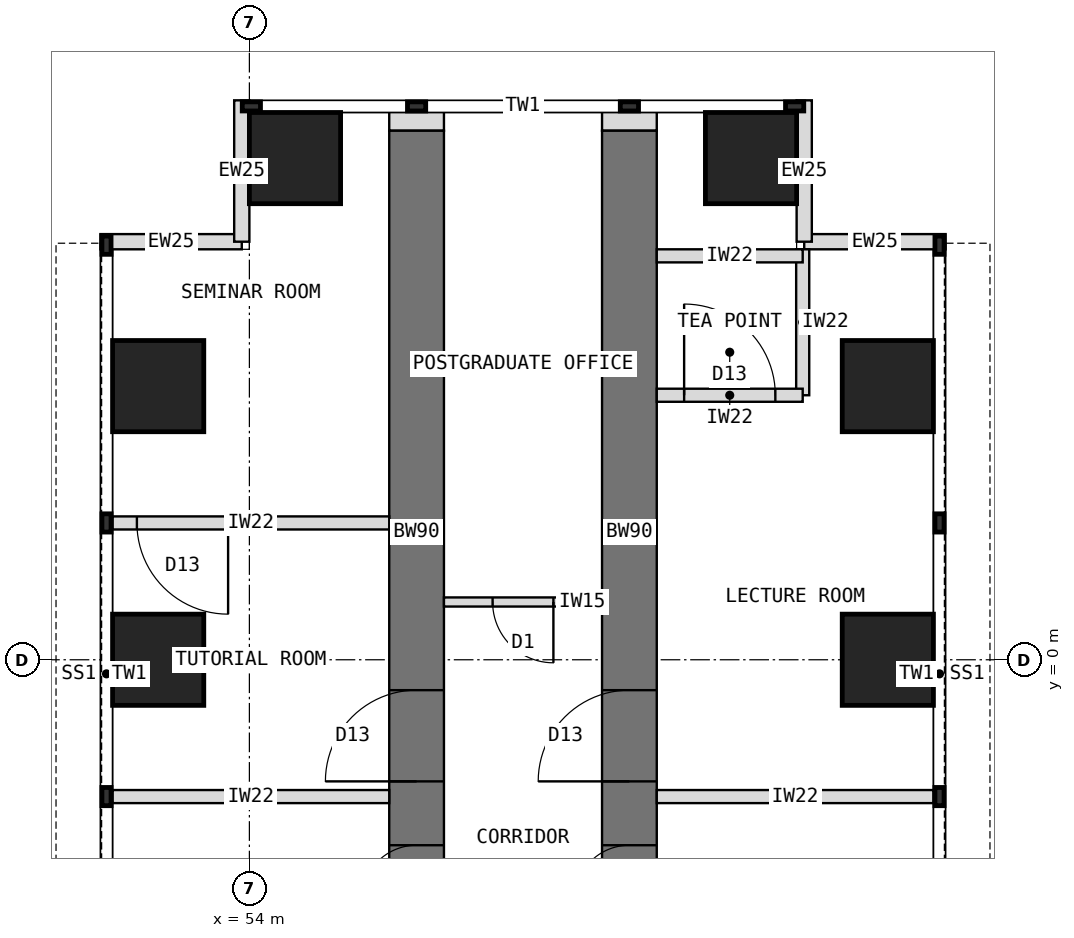
"""IFC4 building model, lengths in metres.
Left out: names, types, materials, properties, quantities, classifications, styles, units other than length and angle.
Written with IfcOpenShell. Run it as: python <this file> out.ifc"""

import sys

from ifc_helpers import new_model, si_unit, direction, frame, frame_2d, origin, origin_2d, place, context, subcontext, project, spatial, rectangle, extrude, element, fill, save


model = new_model("IFC4")
c1 = context("Model", 3, precision=1e-05, world=origin(), true_north=direction((0.0, 1.0)))
c2 = subcontext(c1, "Body", "Model", "MODEL_VIEW")
j1 = project(units=[si_unit("LENGTHUNIT", "METRE"), si_unit("PLANEANGLEUNIT", "RADIAN")], contexts=[c1])
p1 = place(None, origin())
s1 = spatial("IfcSite", under=j1, at=p1, CompositionType="ELEMENT")
p2 = place(p1, origin())
s2 = spatial("IfcBuilding", under=s1, at=p2, CompositionType="ELEMENT")
p3 = place(p2, frame((0.0, 0.0, 28.5)))
s3 = spatial("IfcBuildingStorey", under=s2, at=p3, CompositionType="ELEMENT", Elevation=28.5)
p4 = place(p3, frame((56.75, -4.5, 0.0), z_axis=(0.0, 0.0, 1.0), x_axis=(0.0, 1.0, 0.0)))
e1 = element("IfcWall", 1, at=p4, inside=s3, PredefinedType="SHEAR", context=c2, shape_type="SweptSolid", body=[
    extrude(rectangle(XDim=13.2, YDim=0.9, at=frame_2d((6.6, 0.0))), origin(), (0.0, 0.0, 1.0), 4.0),
])
p5 = place(p4, frame((0.55, 0.0, 0.0)))
e2 = element("IfcOpeningElement", 2, at=p5, cuts=e1, PredefinedType="OPENING", context=c2, shape_type="SweptSolid", body=[
    extrude(rectangle(XDim=0.9, YDim=2.1, at=frame_2d((0.45, 1.05))), frame((0.0, 0.46, 0.0), z_axis=(0.0, -1.0, 0.0), x_axis=(1.0, 0.0, 0.0)), (0.0, 0.0, 1.0), 0.92),
])
p6 = place(p4, frame((2.5, 0.0, 0.0)))
e3 = element("IfcOpeningElement", 3, at=p6, cuts=e1, PredefinedType="OPENING", context=c2, shape_type="SweptSolid", body=[
    extrude(rectangle(XDim=1.5, YDim=2.1, at=frame_2d((0.75, 1.05))), frame((0.0, 0.46, 0.0), z_axis=(0.0, -1.0, 0.0), x_axis=(1.0, 0.0, 0.0)), (0.0, 0.0, 1.0), 0.92),
])
p7 = place(p3, frame((60.25, -4.5, 0.0), z_axis=(0.0, 0.0, 1.0), x_axis=(0.0, 1.0, 0.0)))
e4 = element("IfcWall", 4, at=p7, inside=s3, PredefinedType="SHEAR", context=c2, shape_type="SweptSolid", body=[
    extrude(rectangle(XDim=13.2, YDim=0.9, at=frame_2d((6.6, 0.0))), origin(), (0.0, 0.0, 1.0), 4.0),
])
p8 = place(p7, frame((0.55, 0.0, 0.0)))
e5 = element("IfcOpeningElement", 5, at=p8, cuts=e4, PredefinedType="OPENING", context=c2, shape_type="SweptSolid", body=[
    extrude(rectangle(XDim=0.9, YDim=2.1, at=frame_2d((0.45, 1.05))), frame((0.0, 0.46, 0.0), z_axis=(0.0, -1.0, 0.0), x_axis=(1.0, 0.0, 0.0)), (0.0, 0.0, 1.0), 0.92),
])
p9 = place(p7, frame((2.5, 0.0, 0.0)))
e6 = element("IfcOpeningElement", 6, at=p9, cuts=e4, PredefinedType="OPENING", context=c2, shape_type="SweptSolid", body=[
    extrude(rectangle(XDim=1.5, YDim=2.1, at=frame_2d((0.75, 1.05))), frame((0.0, 0.46, 0.0), z_axis=(0.0, -1.0, 0.0), x_axis=(1.0, 0.0, 0.0)), (0.0, 0.0, 1.0), 0.92),
])
for number, where, z_axis, x_axis in (
    (7, (52.5, 0.0, 0.0), (0.0, 0.0, 1.0), (1.0, 0.0, 0.0)),
    (8, (64.5, 0.0, 0.0), (0.0, 0.0, 1.0), (1.0, 0.0, 0.0)),
    (9, (52.5, 4.5, 0.0), (0.0, 0.0, 1.0), (1.0, 0.0, 0.0)),
    (10, (64.5, 4.5, 0.0), (0.0, 0.0, 1.0), (1.0, 0.0, 0.0)),
    (11, (54.75, 8.25, 0.0), (0.0, 0.0, 1.0), (1.0, 0.0, 0.0)),
    (12, (62.25, 8.25, 0.0), (0.0, 0.0, 1.0), (1.0, 0.0, 0.0)),
):
    element("IfcColumn", number, at=place(p3, frame(where, z_axis=z_axis, x_axis=x_axis)), inside=s3, PredefinedType="COLUMN", context=c2, shape_type="SweptSolid", body=[
        extrude(rectangle(XDim=1.5, YDim=1.5, at=origin_2d()), origin(), (0.0, 0.0, 1.0), 4.0),
    ])
for number, where, z_axis, x_axis in (
    (13, (51.55, 6.875, 0.0), (0.0, 0.0, 1.0), (1.0, 0.0, 0.0)),
    (14, (53.875, 6.875, 0.0), (0.0, 0.0, 1.0), (0.0, 1.0, 0.0)),
    (15, (65.45, 6.875, 0.0), (0.0, 0.0, 1.0), (-1.0, 0.0, 0.0)),
    (16, (63.125, 6.875, 0.0), (0.0, 0.0, 1.0), (0.0, 1.0, 0.0)),
):
    element("IfcWall", number, at=place(p3, frame(where, z_axis=z_axis, x_axis=x_axis)), inside=s3, PredefinedType="STANDARD", context=c2, shape_type="SweptSolid", body=[
        extrude(rectangle(XDim=2.325, YDim=0.25, at=frame_2d((1.163, 0.0))), origin(), (0.0, 0.0, 1.0), 3.8),
    ])
for number, where, z_axis, x_axis in (
    (17, (56.75, 8.7, 0.0), (0.0, 0.0, 1.0), (0.0, 1.0, 0.0)),
    (18, (60.25, 8.7, 0.0), (0.0, 0.0, 1.0), (0.0, 1.0, 0.0)),
):
    element("IfcWall", number, at=place(p3, frame(where, z_axis=z_axis, x_axis=x_axis)), inside=s3, PredefinedType="PARTITIONING", context=c2, shape_type="SweptSolid", body=[
        extrude(rectangle(XDim=0.31, YDim=0.9, at=frame_2d((0.155, 0.0))), origin(), (0.0, 0.0, 1.0), 3.8),
    ])
p10 = place(p3, frame((56.3, -2.25, 0.0), z_axis=(0.0, 0.0, 1.0), x_axis=(-1.0, 0.0, 0.0)))
e19 = element("IfcWall", 19, at=p10, inside=s3, PredefinedType="PARTITIONING", context=c2, shape_type="SweptSolid", body=[
    extrude(rectangle(XDim=4.55, YDim=0.215, at=frame_2d((2.275, 0.0))), origin(), (0.0, 0.0, 1.0), 3.8),
])
p11 = place(p3, frame((56.3, 2.25, 0.0), z_axis=(0.0, 0.0, 1.0), x_axis=(-1.0, 0.0, 0.0)))
e20 = element("IfcWall", 20, at=p11, inside=s3, PredefinedType="PARTITIONING", context=c2, shape_type="SweptSolid", body=[
    extrude(rectangle(XDim=4.55, YDim=0.215, at=frame_2d((2.275, 0.0))), origin(), (0.0, 0.0, 1.0), 3.8),
])
p12 = place(p11, frame((2.65, 0.0, 0.0)))
e21 = element("IfcOpeningElement", 21, at=p12, cuts=e20, PredefinedType="OPENING", context=c2, shape_type="SweptSolid", body=[
    extrude(rectangle(XDim=1.5, YDim=2.1, at=frame_2d((0.75, 1.05))), frame((0.0, 0.117, 0.0), z_axis=(0.0, -1.0, 0.0), x_axis=(1.0, 0.0, 0.0)), (0.0, 0.0, 1.0), 0.235),
])
p13 = place(p3, frame((60.7, -2.25, 0.0), z_axis=(0.0, 0.0, 1.0), x_axis=(1.0, 0.0, 0.0)))
e22 = element("IfcWall", 22, at=p13, inside=s3, PredefinedType="PARTITIONING", context=c2, shape_type="SweptSolid", body=[
    extrude(rectangle(XDim=4.55, YDim=0.215, at=frame_2d((2.275, 0.0))), origin(), (0.0, 0.0, 1.0), 3.8),
])
p14 = place(p3, frame((63.1, 4.35, 0.0), z_axis=(0.0, 0.0, 1.0), x_axis=(0.0, 1.0, 0.0)))
e23 = element("IfcWall", 23, at=p14, inside=s3, PredefinedType="PARTITIONING", context=c2, shape_type="SweptSolid", body=[
    extrude(rectangle(XDim=2.4, YDim=0.215, at=frame_2d((1.2, 0.0))), origin(), (0.0, 0.0, 1.0), 3.8),
])
p15 = place(p3, frame((60.7, 4.35, 0.0), z_axis=(0.0, 0.0, 1.0), x_axis=(1.0, 0.0, 0.0)))
e24 = element("IfcWall", 24, at=p15, inside=s3, PredefinedType="PARTITIONING", context=c2, shape_type="SweptSolid", body=[
    extrude(rectangle(XDim=2.4, YDim=0.215, at=frame_2d((1.2, 0.0))), origin(), (0.0, 0.0, 1.0), 3.8),
])
p16 = place(p15, frame((0.45, 0.0, 0.0)))
e25 = element("IfcOpeningElement", 25, at=p16, cuts=e24, PredefinedType="OPENING", context=c2, shape_type="SweptSolid", body=[
    extrude(rectangle(XDim=1.5, YDim=2.1, at=frame_2d((0.75, 1.05))), frame((0.0, 0.117, 0.0), z_axis=(0.0, -1.0, 0.0), x_axis=(1.0, 0.0, 0.0)), (0.0, 0.0, 1.0), 0.235),
])
p17 = place(p3, frame((60.7, 6.643, 0.0), z_axis=(0.0, 0.0, 1.0), x_axis=(1.0, 0.0, 0.0)))
e26 = element("IfcWall", 26, at=p17, inside=s3, PredefinedType="PARTITIONING", context=c2, shape_type="SweptSolid", body=[
    extrude(rectangle(XDim=2.4, YDim=0.215, at=frame_2d((1.2, 0.0))), origin(), (0.0, 0.0, 1.0), 3.8),
])
p18 = place(p3, frame((59.8, 0.95, 0.0), z_axis=(0.0, 0.0, 1.0), x_axis=(-1.0, 0.0, 0.0)))
e27 = element("IfcWall", 27, at=p18, inside=s3, PredefinedType="PARTITIONING", context=c2, shape_type="SweptSolid", body=[
    extrude(rectangle(XDim=2.6, YDim=0.15, at=frame_2d((1.3, 0.0))), origin(), (0.0, 0.0, 1.0), 3.8),
])
p19 = place(p18, frame((0.8, 0.0, 0.0)))
e28 = element("IfcOpeningElement", 28, at=p19, cuts=e27, PredefinedType="OPENING", context=c2, shape_type="SweptSolid", body=[
    extrude(rectangle(XDim=1.0, YDim=2.1, at=frame_2d((0.5, 1.05))), frame((0.0, 0.085, 0.0), z_axis=(0.0, -1.0, 0.0), x_axis=(1.0, 0.0, 0.0)), (0.0, 0.0, 1.0), 0.17),
])
p20 = place(p12, origin())
e29 = element("IfcDoor", 29, at=p20, inside=s3, OperationType="DOUBLE_DOOR_SINGLE_SWING", PredefinedType="DOOR", context=c2, shape_type="SweptSolid", body=[
    extrude(rectangle(XDim=1.5, YDim=2.1, at=frame_2d((0.75, 1.05))), frame((0.0, 0.025, 0.0), z_axis=(0.0, -1.0, 0.0), x_axis=(1.0, 0.0, 0.0)), (0.0, 0.0, 1.0), 0.05),
])
fill(e21, e29)
p21 = place(p16, origin())
e30 = element("IfcDoor", 30, at=p21, inside=s3, OperationType="DOUBLE_DOOR_SINGLE_SWING", PredefinedType="DOOR", context=c2, shape_type="SweptSolid", body=[
    extrude(rectangle(XDim=1.5, YDim=2.1, at=frame_2d((0.75, 1.05))), frame((0.0, 0.025, 0.0), z_axis=(0.0, -1.0, 0.0), x_axis=(1.0, 0.0, 0.0)), (0.0, 0.0, 1.0), 0.05),
])
fill(e25, e30)
p22 = place(p19, origin())
e31 = element("IfcDoor", 31, at=p22, inside=s3, OperationType="SINGLE_SWING_LEFT", PredefinedType="DOOR", context=c2, shape_type="SweptSolid", body=[
    extrude(rectangle(XDim=1.0, YDim=2.1, at=frame_2d((0.5, 1.05))), frame((0.0, 0.025, 0.0), z_axis=(0.0, -1.0, 0.0), x_axis=(1.0, 0.0, 0.0)), (0.0, 0.0, 1.0), 0.05),
])
fill(e28, e31)
p23 = place(p5, origin())
e32 = element("IfcDoor", 32, at=p23, inside=s3, OperationType="SINGLE_SWING_LEFT", PredefinedType="DOOR", context=c2, shape_type="SweptSolid", body=[
    extrude(rectangle(XDim=0.82, YDim=2.06, at=frame_2d((0.45, 1.03))), frame((0.0, 0.025, 0.0), z_axis=(0.0, -1.0, 0.0), x_axis=(1.0, 0.0, 0.0)), (0.0, 0.0, 1.0), 0.05),
    extrude(rectangle(XDim=0.04, YDim=2.1, at=frame_2d((0.02, 1.05))), frame((0.0, 0.45, 0.0), z_axis=(0.0, -1.0, 0.0), x_axis=(1.0, 0.0, 0.0)), (0.0, 0.0, 1.0), 0.899),
    extrude(rectangle(XDim=0.04, YDim=2.1, at=frame_2d((0.88, 1.05))), frame((0.0, 0.45, 0.0), z_axis=(0.0, -1.0, 0.0), x_axis=(1.0, 0.0, 0.0)), (0.0, 0.0, 1.0), 0.899),
    extrude(rectangle(XDim=0.82, YDim=0.04, at=frame_2d((0.45, 2.08))), frame((0.0, 0.45, 0.0), z_axis=(0.0, -1.0, 0.0), x_axis=(1.0, 0.0, 0.0)), (0.0, 0.0, 1.0), 0.899),
])
fill(e2, e32)
p24 = place(p6, origin())
e33 = element("IfcDoor", 33, at=p24, inside=s3, OperationType="DOUBLE_DOOR_SINGLE_SWING", PredefinedType="DOOR", context=c2, shape_type="SweptSolid", body=[
    extrude(rectangle(XDim=1.42, YDim=2.06, at=frame_2d((0.75, 1.03))), frame((0.0, 0.025, 0.0), z_axis=(0.0, -1.0, 0.0), x_axis=(1.0, 0.0, 0.0)), (0.0, 0.0, 1.0), 0.05),
    extrude(rectangle(XDim=0.04, YDim=2.1, at=frame_2d((0.02, 1.05))), frame((0.0, 0.45, 0.0), z_axis=(0.0, -1.0, 0.0), x_axis=(1.0, 0.0, 0.0)), (0.0, 0.0, 1.0), 0.899),
    extrude(rectangle(XDim=0.04, YDim=2.1, at=frame_2d((1.48, 1.05))), frame((0.0, 0.45, 0.0), z_axis=(0.0, -1.0, 0.0), x_axis=(1.0, 0.0, 0.0)), (0.0, 0.0, 1.0), 0.899),
    extrude(rectangle(XDim=1.42, YDim=0.04, at=frame_2d((0.75, 2.08))), frame((0.0, 0.45, 0.0), z_axis=(0.0, -1.0, 0.0), x_axis=(1.0, 0.0, 0.0)), (0.0, 0.0, 1.0), 0.899),
])
fill(e3, e33)
p25 = place(p8, origin())
e34 = element("IfcDoor", 34, at=p25, inside=s3, OperationType="SINGLE_SWING_LEFT", PredefinedType="DOOR", context=c2, shape_type="SweptSolid", body=[
    extrude(rectangle(XDim=0.82, YDim=2.06, at=frame_2d((0.45, 1.03))), frame((0.0, 0.025, 0.0), z_axis=(0.0, -1.0, 0.0), x_axis=(1.0, 0.0, 0.0)), (0.0, 0.0, 1.0), 0.05),
    extrude(rectangle(XDim=0.04, YDim=2.1, at=frame_2d((0.02, 1.05))), frame((0.0, 0.45, 0.0), z_axis=(0.0, -1.0, 0.0), x_axis=(1.0, 0.0, 0.0)), (0.0, 0.0, 1.0), 0.899),
    extrude(rectangle(XDim=0.04, YDim=2.1, at=frame_2d((0.88, 1.05))), frame((0.0, 0.45, 0.0), z_axis=(0.0, -1.0, 0.0), x_axis=(1.0, 0.0, 0.0)), (0.0, 0.0, 1.0), 0.899),
    extrude(rectangle(XDim=0.82, YDim=0.04, at=frame_2d((0.45, 2.08))), frame((0.0, 0.45, 0.0), z_axis=(0.0, -1.0, 0.0), x_axis=(1.0, 0.0, 0.0)), (0.0, 0.0, 1.0), 0.899),
])
fill(e5, e34)
p26 = place(p9, origin())
e35 = element("IfcDoor", 35, at=p26, inside=s3, OperationType="DOUBLE_DOOR_SINGLE_SWING", PredefinedType="DOOR", context=c2, shape_type="SweptSolid", body=[
    extrude(rectangle(XDim=1.42, YDim=2.06, at=frame_2d((0.75, 1.03))), frame((0.0, 0.025, 0.0), z_axis=(0.0, -1.0, 0.0), x_axis=(1.0, 0.0, 0.0)), (0.0, 0.0, 1.0), 0.05),
    extrude(rectangle(XDim=0.04, YDim=2.1, at=frame_2d((0.02, 1.05))), frame((0.0, 0.45, 0.0), z_axis=(0.0, -1.0, 0.0), x_axis=(1.0, 0.0, 0.0)), (0.0, 0.0, 1.0), 0.899),
    extrude(rectangle(XDim=0.04, YDim=2.1, at=frame_2d((1.48, 1.05))), frame((0.0, 0.45, 0.0), z_axis=(0.0, -1.0, 0.0), x_axis=(1.0, 0.0, 0.0)), (0.0, 0.0, 1.0), 0.899),
    extrude(rectangle(XDim=1.42, YDim=0.04, at=frame_2d((0.75, 2.08))), frame((0.0, 0.45, 0.0), z_axis=(0.0, -1.0, 0.0), x_axis=(1.0, 0.0, 0.0)), (0.0, 0.0, 1.0), 0.899),
])
fill(e6, e35)
save(model, sys.argv[1])
